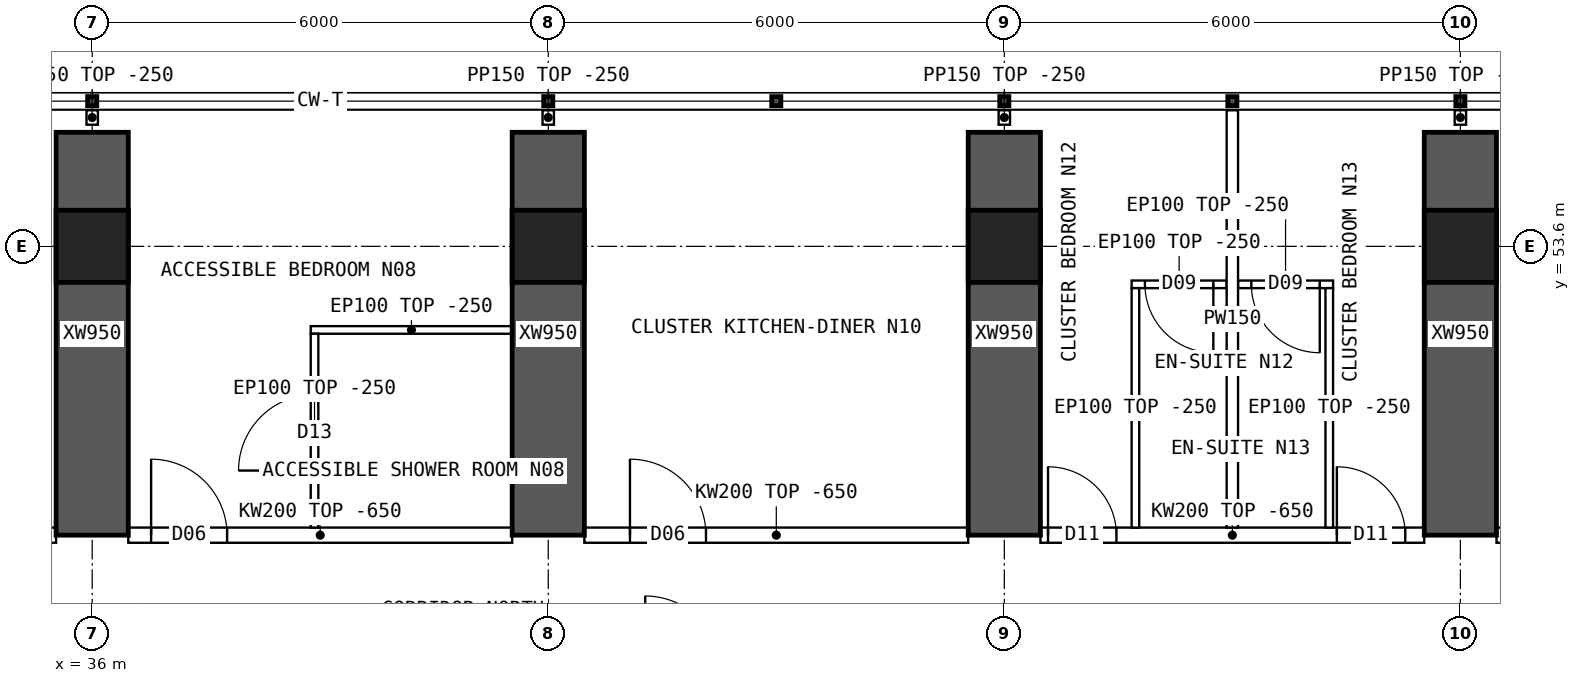
"""IFC4 building model, lengths in metres.
Left out: names, types, materials, properties, quantities, classifications, styles, units other than length and angle.
Written with IfcOpenShell. Run it as: python <this file> out.ifc"""

import sys

from ifc_helpers import new_model, si_unit, direction, frame, frame_2d, origin, origin_2d, place, context, subcontext, project, spatial, polyline, rectangle, hollow_rectangle, outline, extrude, element, fill, save


model = new_model("IFC4")
c1 = context("Model", 3, precision=1e-05, world=origin(), true_north=direction((0.0, 1.0)))
c2 = subcontext(c1, "Body", "Model", "MODEL_VIEW")
j1 = project(units=[si_unit("LENGTHUNIT", "METRE"), si_unit("PLANEANGLEUNIT", "RADIAN")], contexts=[c1])
p1 = place(None, origin())
s1 = spatial("IfcSite", under=j1, at=p1, CompositionType="ELEMENT")
p2 = place(p1, origin())
s2 = spatial("IfcBuilding", under=s1, at=p2, CompositionType="ELEMENT")
p3 = place(p2, frame((0.0, 0.0, 118.15)))
s3 = spatial("IfcBuildingStorey", under=s2, at=p3, CompositionType="ELEMENT", Elevation=118.15)
for number, where, z_axis, x_axis in (
    (1, (36.0, 53.6, 0.0), (0.0, 0.0, 1.0), (1.0, 0.0, 0.0)),
    (2, (42.0, 53.6, 0.0), (0.0, 0.0, 1.0), (1.0, 0.0, 0.0)),
    (3, (48.0, 53.6, 0.0), (0.0, 0.0, 1.0), (1.0, 0.0, 0.0)),
    (4, (54.0, 53.6, 0.0), (0.0, 0.0, 1.0), (1.0, 0.0, 0.0)),
):
    element("IfcColumn", number, at=place(p3, frame(where, z_axis=z_axis, x_axis=x_axis)), inside=s3, PredefinedType="COLUMN", context=c2, shape_type="SweptSolid", body=[
        extrude(hollow_rectangle(XDim=0.95, YDim=0.95, WallThickness=0.095, at=origin_2d()), origin(), (0.0, 0.0, 1.0), 3.75),
    ])
for number, where, z_axis, x_axis in (
    (5, (36.0, 49.8, 0.0), (0.0, 0.0, 1.0), (0.0, 1.0, 0.0)),
    (6, (42.0, 49.8, 0.0), (0.0, 0.0, 1.0), (0.0, 1.0, 0.0)),
    (7, (48.0, 49.8, 0.0), (0.0, 0.0, 1.0), (0.0, 1.0, 0.0)),
    (8, (54.0, 49.8, 0.0), (0.0, 0.0, 1.0), (0.0, 1.0, 0.0)),
):
    element("IfcWall", number, at=place(p3, frame(where, z_axis=z_axis, x_axis=x_axis)), inside=s3, PredefinedType="SHEAR", context=c2, shape_type="SweptSolid", body=[
        extrude(rectangle(XDim=5.3, YDim=0.95, at=frame_2d((2.65, 0.0))), origin(), (0.0, 0.0, 1.0), 3.75),
    ])
p4 = place(p3, frame((30.475, 49.8, 0.0), z_axis=(0.0, 0.0, 1.0), x_axis=(1.0, 0.0, 0.0)))
e9 = element("IfcWall", 9, at=p4, inside=s3, PredefinedType="SOLIDWALL", context=c2, shape_type="SweptSolid", body=[
    extrude(outline(polyline([(0.0, 0.0), (5.05, 0.0), (5.05, 3.1), (0.0, 3.1), (0.0, 0.0)])), frame((0.0, 0.1, 0.0), z_axis=(0.0, -1.0, 0.0), x_axis=(1.0, 0.0, 0.0)), (0.0, 0.0, 1.0), 0.2),
])
p5 = place(p4, frame((0.1, 0.0, 0.0)))
e10 = element("IfcOpeningElement", 10, at=p5, cuts=e9, PredefinedType="OPENING", context=c2, shape_type="SweptSolid", body=[
    extrude(rectangle(XDim=0.9, YDim=2.1, at=frame_2d((0.45, 1.05))), frame((0.0, 0.11, 0.0), z_axis=(0.0, -1.0, 0.0), x_axis=(1.0, 0.0, 0.0)), (0.0, 0.0, 1.0), 0.22),
])
p6 = place(p4, frame((3.9, 0.0, 0.0)))
e11 = element("IfcOpeningElement", 11, at=p6, cuts=e9, PredefinedType="OPENING", context=c2, shape_type="SweptSolid", body=[
    extrude(rectangle(XDim=0.9, YDim=2.1, at=frame_2d((0.45, 1.05))), frame((0.0, 0.11, 0.0), z_axis=(0.0, -1.0, 0.0), x_axis=(1.0, 0.0, 0.0)), (0.0, 0.0, 1.0), 0.22),
])
p7 = place(p3, frame((36.475, 49.8, 0.0), z_axis=(0.0, 0.0, 1.0), x_axis=(1.0, 0.0, 0.0)))
e12 = element("IfcWall", 12, at=p7, inside=s3, PredefinedType="SOLIDWALL", context=c2, shape_type="SweptSolid", body=[
    extrude(outline(polyline([(0.0, 0.0), (5.05, 0.0), (5.05, 3.1), (0.0, 3.1), (0.0, 0.0)])), frame((0.0, 0.1, 0.0), z_axis=(0.0, -1.0, 0.0), x_axis=(1.0, 0.0, 0.0)), (0.0, 0.0, 1.0), 0.2),
])
p8 = place(p7, frame((0.3, 0.0, 0.0)))
e13 = element("IfcOpeningElement", 13, at=p8, cuts=e12, PredefinedType="OPENING", context=c2, shape_type="SweptSolid", body=[
    extrude(rectangle(XDim=1.0, YDim=2.1, at=frame_2d((0.5, 1.05))), frame((0.0, 0.11, 0.0), z_axis=(0.0, -1.0, 0.0), x_axis=(1.0, 0.0, 0.0)), (0.0, 0.0, 1.0), 0.22),
])
p9 = place(p3, frame((42.475, 49.8, 0.0), z_axis=(0.0, 0.0, 1.0), x_axis=(1.0, 0.0, 0.0)))
e14 = element("IfcWall", 14, at=p9, inside=s3, PredefinedType="SOLIDWALL", context=c2, shape_type="SweptSolid", body=[
    extrude(outline(polyline([(0.0, 0.0), (5.05, 0.0), (5.05, 3.1), (0.0, 3.1), (0.0, 0.0)])), frame((0.0, 0.1, 0.0), z_axis=(0.0, -1.0, 0.0), x_axis=(1.0, 0.0, 0.0)), (0.0, 0.0, 1.0), 0.2),
])
p10 = place(p9, frame((0.6, 0.0, 0.0)))
e15 = element("IfcOpeningElement", 15, at=p10, cuts=e14, PredefinedType="OPENING", context=c2, shape_type="SweptSolid", body=[
    extrude(rectangle(XDim=1.0, YDim=2.1, at=frame_2d((0.5, 1.05))), frame((0.0, 0.11, 0.0), z_axis=(0.0, -1.0, 0.0), x_axis=(1.0, 0.0, 0.0)), (0.0, 0.0, 1.0), 0.22),
])
p11 = place(p3, frame((48.475, 49.8, 0.0), z_axis=(0.0, 0.0, 1.0), x_axis=(1.0, 0.0, 0.0)))
e16 = element("IfcWall", 16, at=p11, inside=s3, PredefinedType="SOLIDWALL", context=c2, shape_type="SweptSolid", body=[
    extrude(outline(polyline([(0.0, 0.0), (5.05, 0.0), (5.05, 3.1), (0.0, 3.1), (0.0, 0.0)])), frame((0.0, 0.1, 0.0), z_axis=(0.0, -1.0, 0.0), x_axis=(1.0, 0.0, 0.0)), (0.0, 0.0, 1.0), 0.2),
])
p12 = place(p11, frame((0.1, 0.0, 0.0)))
e17 = element("IfcOpeningElement", 17, at=p12, cuts=e16, PredefinedType="OPENING", context=c2, shape_type="SweptSolid", body=[
    extrude(rectangle(XDim=0.9, YDim=2.1, at=frame_2d((0.45, 1.05))), frame((0.0, 0.11, 0.0), z_axis=(0.0, -1.0, 0.0), x_axis=(1.0, 0.0, 0.0)), (0.0, 0.0, 1.0), 0.22),
])
p13 = place(p11, frame((3.9, 0.0, 0.0)))
e18 = element("IfcOpeningElement", 18, at=p13, cuts=e16, PredefinedType="OPENING", context=c2, shape_type="SweptSolid", body=[
    extrude(rectangle(XDim=0.9, YDim=2.1, at=frame_2d((0.45, 1.05))), frame((0.0, 0.11, 0.0), z_axis=(0.0, -1.0, 0.0), x_axis=(1.0, 0.0, 0.0)), (0.0, 0.0, 1.0), 0.22),
])
p14 = place(p3, frame((54.475, 49.8, 0.0), z_axis=(0.0, 0.0, 1.0), x_axis=(1.0, 0.0, 0.0)))
e19 = element("IfcWall", 19, at=p14, inside=s3, PredefinedType="SOLIDWALL", context=c2, shape_type="SweptSolid", body=[
    extrude(outline(polyline([(0.0, 0.0), (5.05, 0.0), (5.05, 3.1), (0.0, 3.1), (0.0, 0.0)])), frame((0.0, 0.1, 0.0), z_axis=(0.0, -1.0, 0.0), x_axis=(1.0, 0.0, 0.0)), (0.0, 0.0, 1.0), 0.2),
])
p15 = place(p14, frame((0.1, 0.0, 0.0)))
e20 = element("IfcOpeningElement", 20, at=p15, cuts=e19, PredefinedType="OPENING", context=c2, shape_type="SweptSolid", body=[
    extrude(rectangle(XDim=0.9, YDim=2.1, at=frame_2d((0.45, 1.05))), frame((0.0, 0.11, 0.0), z_axis=(0.0, -1.0, 0.0), x_axis=(1.0, 0.0, 0.0)), (0.0, 0.0, 1.0), 0.22),
])
p16 = place(p14, frame((3.9, 0.0, 0.0)))
e21 = element("IfcOpeningElement", 21, at=p16, cuts=e19, PredefinedType="OPENING", context=c2, shape_type="SweptSolid", body=[
    extrude(rectangle(XDim=0.9, YDim=2.1, at=frame_2d((0.45, 1.05))), frame((0.0, 0.11, 0.0), z_axis=(0.0, -1.0, 0.0), x_axis=(1.0, 0.0, 0.0)), (0.0, 0.0, 1.0), 0.22),
])
p17 = place(p3, frame((38.875, 52.5, 0.0), z_axis=(0.0, 0.0, 1.0), x_axis=(1.0, 0.0, 0.0)))
e22 = element("IfcWall", 22, at=p17, inside=s3, PredefinedType="PARTITIONING", context=c2, shape_type="SweptSolid", body=[
    extrude(rectangle(XDim=2.65, YDim=0.1, at=frame_2d((1.325, 0.0))), origin(), (0.0, 0.0, 1.0), 3.5),
])
p18 = place(p3, frame((38.925, 52.45, 0.0), z_axis=(0.0, 0.0, 1.0), x_axis=(0.0, -1.0, 0.0)))
e23 = element("IfcWall", 23, at=p18, inside=s3, PredefinedType="PARTITIONING", context=c2, shape_type="SweptSolid", body=[
    extrude(outline(polyline([(0.0, 0.0), (2.55, 0.0), (2.55, 3.1), (2.502, 3.1), (2.5, 3.5), (0.0, 3.5), (0.0, 0.0)])), frame((0.0, 0.05, 0.0), z_axis=(0.0, -1.0, 0.0), x_axis=(1.0, 0.0, 0.0)), (0.0, 0.0, 1.0), 0.1),
])
p19 = place(p18, frame((0.8, 0.0, 0.0)))
e24 = element("IfcOpeningElement", 24, at=p19, cuts=e23, PredefinedType="OPENING", context=c2, shape_type="SweptSolid", body=[
    extrude(rectangle(XDim=1.0, YDim=2.1, at=frame_2d((0.5, 1.05))), frame((0.0, 0.06, 0.0), z_axis=(0.0, -1.0, 0.0), x_axis=(1.0, 0.0, 0.0)), (0.0, 0.0, 1.0), 0.12),
])
p20 = place(p3, frame((51.0, 55.39, 0.0), z_axis=(0.0, 0.0, 1.0), x_axis=(0.0, -1.0, 0.0)))
e25 = element("IfcWall", 25, at=p20, inside=s3, PredefinedType="PARTITIONING", context=c2, shape_type="SweptSolid", body=[
    extrude(outline(polyline([(0.0, 0.0), (5.49, 0.0), (5.49, 3.1), (5.442, 3.1), (5.44, 3.5), (1.992, 3.5), (1.99, 3.1), (1.592, 3.1), (1.59, 3.5), (0.0, 3.5), (0.0, 0.0)])), frame((0.0, 0.075, 0.0), z_axis=(0.0, -1.0, 0.0), x_axis=(1.0, 0.0, 0.0)), (0.0, 0.0, 1.0), 0.15),
])
p21 = place(p3, frame((49.675, 53.1, 0.0), z_axis=(0.0, 0.0, 1.0), x_axis=(1.0, 0.0, 0.0)))
e26 = element("IfcWall", 26, at=p21, inside=s3, PredefinedType="PARTITIONING", context=c2, shape_type="SweptSolid", body=[
    extrude(rectangle(XDim=1.25, YDim=0.1, at=frame_2d((0.625, 0.0))), origin(), (0.0, 0.0, 1.0), 3.5),
])
p22 = place(p21, frame((0.175, 0.0, 0.0)))
e27 = element("IfcOpeningElement", 27, at=p22, cuts=e26, PredefinedType="OPENING", context=c2, shape_type="SweptSolid", body=[
    extrude(rectangle(XDim=0.9, YDim=2.1, at=frame_2d((0.45, 1.05))), frame((0.0, 0.06, 0.0), z_axis=(0.0, -1.0, 0.0), x_axis=(1.0, 0.0, 0.0)), (0.0, 0.0, 1.0), 0.12),
])
p23 = place(p3, frame((49.725, 53.05, 0.0), z_axis=(0.0, 0.0, 1.0), x_axis=(0.0, -1.0, 0.0)))
e28 = element("IfcWall", 28, at=p23, inside=s3, PredefinedType="PARTITIONING", context=c2, shape_type="SweptSolid", body=[
    extrude(outline(polyline([(0.0, 0.0), (3.15, 0.0), (3.15, 3.1), (3.102, 3.1), (3.1, 3.5), (0.0, 3.5), (0.0, 0.0)])), frame((0.0, 0.05, 0.0), z_axis=(0.0, -1.0, 0.0), x_axis=(1.0, 0.0, 0.0)), (0.0, 0.0, 1.0), 0.1),
])
p24 = place(p3, frame((51.075, 53.1, 0.0), z_axis=(0.0, 0.0, 1.0), x_axis=(1.0, 0.0, 0.0)))
e29 = element("IfcWall", 29, at=p24, inside=s3, PredefinedType="PARTITIONING", context=c2, shape_type="SweptSolid", body=[
    extrude(rectangle(XDim=1.25, YDim=0.1, at=frame_2d((0.625, 0.0))), origin(), (0.0, 0.0, 1.0), 3.5),
])
p25 = place(p24, frame((0.175, 0.0, 0.0)))
e30 = element("IfcOpeningElement", 30, at=p25, cuts=e29, PredefinedType="OPENING", context=c2, shape_type="SweptSolid", body=[
    extrude(rectangle(XDim=0.9, YDim=2.1, at=frame_2d((0.45, 1.05))), frame((0.0, 0.06, 0.0), z_axis=(0.0, -1.0, 0.0), x_axis=(1.0, 0.0, 0.0)), (0.0, 0.0, 1.0), 0.12),
])
p26 = place(p3, frame((52.275, 53.05, 0.0), z_axis=(0.0, 0.0, 1.0), x_axis=(0.0, -1.0, 0.0)))
e31 = element("IfcWall", 31, at=p26, inside=s3, PredefinedType="PARTITIONING", context=c2, shape_type="SweptSolid", body=[
    extrude(outline(polyline([(0.0, 0.0), (3.15, 0.0), (3.15, 3.1), (3.102, 3.1), (3.1, 3.5), (0.0, 3.5), (0.0, 0.0)])), frame((0.0, 0.05, 0.0), z_axis=(0.0, -1.0, 0.0), x_axis=(1.0, 0.0, 0.0)), (0.0, 0.0, 1.0), 0.1),
])
for number, where, z_axis, x_axis in (
    (32, (36.0, 55.2, 0.0), (0.0, 0.0, 1.0), (0.0, 1.0, 0.0)),
    (33, (42.0, 55.2, 0.0), (0.0, 0.0, 1.0), (0.0, 1.0, 0.0)),
    (34, (48.0, 55.2, 0.0), (0.0, 0.0, 1.0), (0.0, 1.0, 0.0)),
    (35, (54.0, 55.2, 0.0), (0.0, 0.0, 1.0), (0.0, 1.0, 0.0)),
):
    element("IfcWall", number, at=place(p3, frame(where, z_axis=z_axis, x_axis=x_axis)), inside=s3, PredefinedType="PARTITIONING", context=c2, shape_type="SweptSolid", body=[
        extrude(rectangle(XDim=0.19, YDim=0.15, at=frame_2d((0.095, 0.0))), origin(), (0.0, 0.0, 1.0), 3.5),
    ])
p27 = place(p19, origin())
e36 = element("IfcDoor", 36, at=p27, inside=s3, OperationType="SINGLE_SWING_RIGHT", PredefinedType="DOOR", context=c2, shape_type="SweptSolid", body=[
    extrude(rectangle(XDim=1.0, YDim=2.1, at=frame_2d((0.5, 1.05))), frame((0.0, 0.025, 0.0), z_axis=(0.0, -1.0, 0.0), x_axis=(1.0, 0.0, 0.0)), (0.0, 0.0, 1.0), 0.05),
])
fill(e24, e36)
p28 = place(p8, origin())
e37 = element("IfcDoor", 37, at=p28, inside=s3, OperationType="SINGLE_SWING_LEFT", PredefinedType="DOOR", context=c2, shape_type="SweptSolid", body=[
    extrude(rectangle(XDim=1.0, YDim=2.1, at=frame_2d((0.5, 1.05))), frame((0.0, 0.025, 0.0), z_axis=(0.0, -1.0, 0.0), x_axis=(1.0, 0.0, 0.0)), (0.0, 0.0, 1.0), 0.05),
])
fill(e13, e37)
p29 = place(p10, origin())
e38 = element("IfcDoor", 38, at=p29, inside=s3, OperationType="SINGLE_SWING_LEFT", PredefinedType="DOOR", context=c2, shape_type="SweptSolid", body=[
    extrude(rectangle(XDim=1.0, YDim=2.1, at=frame_2d((0.5, 1.05))), frame((0.0, 0.025, 0.0), z_axis=(0.0, -1.0, 0.0), x_axis=(1.0, 0.0, 0.0)), (0.0, 0.0, 1.0), 0.05),
])
fill(e15, e38)
p30 = place(p22, origin())
e39 = element("IfcDoor", 39, at=p30, inside=s3, OperationType="SINGLE_SWING_RIGHT", PredefinedType="DOOR", context=c2, shape_type="SweptSolid", body=[
    extrude(rectangle(XDim=0.9, YDim=2.1, at=frame_2d((0.45, 1.05))), frame((0.0, 0.025, 0.0), z_axis=(0.0, -1.0, 0.0), x_axis=(1.0, 0.0, 0.0)), (0.0, 0.0, 1.0), 0.05),
])
fill(e27, e39)
p31 = place(p12, origin())
e40 = element("IfcDoor", 40, at=p31, inside=s3, OperationType="SINGLE_SWING_LEFT", PredefinedType="DOOR", context=c2, shape_type="SweptSolid", body=[
    extrude(rectangle(XDim=0.9, YDim=2.1, at=frame_2d((0.45, 1.05))), frame((0.0, 0.025, 0.0), z_axis=(0.0, -1.0, 0.0), x_axis=(1.0, 0.0, 0.0)), (0.0, 0.0, 1.0), 0.05),
])
fill(e17, e40)
p32 = place(p25, origin())
e41 = element("IfcDoor", 41, at=p32, inside=s3, OperationType="SINGLE_SWING_RIGHT", PredefinedType="DOOR", context=c2, shape_type="SweptSolid", body=[
    extrude(rectangle(XDim=0.9, YDim=2.1, at=frame_2d((0.45, 1.05))), frame((0.0, 0.025, 0.0), z_axis=(0.0, -1.0, 0.0), x_axis=(1.0, 0.0, 0.0)), (0.0, 0.0, 1.0), 0.05),
])
fill(e30, e41)
p33 = place(p13, origin())
e42 = element("IfcDoor", 42, at=p33, inside=s3, OperationType="SINGLE_SWING_LEFT", PredefinedType="DOOR", context=c2, shape_type="SweptSolid", body=[
    extrude(rectangle(XDim=0.9, YDim=2.1, at=frame_2d((0.45, 1.05))), frame((0.0, 0.025, 0.0), z_axis=(0.0, -1.0, 0.0), x_axis=(1.0, 0.0, 0.0)), (0.0, 0.0, 1.0), 0.05),
])
fill(e18, e42)
save(model, sys.argv[1])
